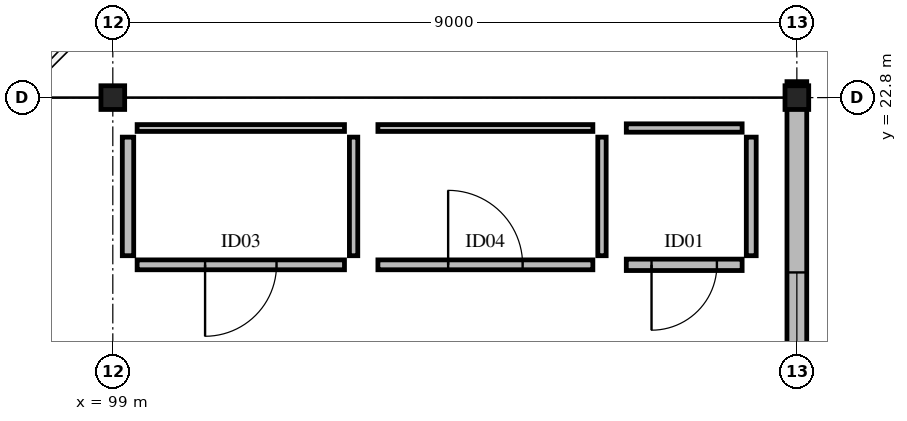
"""IFC4 building model, lengths in metres.
Left out: names, types, materials, properties, quantities, classifications, styles, units other than length and angle.
Written with IfcOpenShell. Run it as: python <this file> out.ifc"""

import sys

from ifc_helpers import new_model, si_unit, direction, frame, frame_2d, origin, origin_2d, place, context, subcontext, project, spatial, rectangle, i_section, extrude, element, fill, save


model = new_model("IFC4")
c1 = context("Model", 3, precision=1e-05, world=origin(), true_north=direction((0.0, 1.0)))
c2 = subcontext(c1, "Body", "Model", "MODEL_VIEW")
j1 = project(units=[si_unit("LENGTHUNIT", "METRE"), si_unit("PLANEANGLEUNIT", "RADIAN")], contexts=[c1])
p1 = place(None, origin())
s1 = spatial("IfcSite", under=j1, at=p1, CompositionType="ELEMENT")
p2 = place(p1, origin())
s2 = spatial("IfcBuilding", under=s1, at=p2, CompositionType="ELEMENT")
p3 = place(p2, frame((0.0, 0.0, 9.36)))
s3 = spatial("IfcBuildingStorey", under=s2, at=p3, CompositionType="ELEMENT", Elevation=9.36)
for number, where, z_axis, x_axis in (
    (1, (99.0, 22.8, 0.0), (0.0, 0.0, 1.0), (1.0, 0.0, 0.0)),
    (2, (108.0, 22.8, 0.0), (0.0, 0.0, 1.0), (1.0, 0.0, 0.0)),
):
    element("IfcColumn", number, at=place(p3, frame(where, z_axis=z_axis, x_axis=x_axis)), inside=s3, PredefinedType="COLUMN", context=c2, shape_type="SweptSolid", body=[
        extrude(i_section(OverallWidth=0.312, OverallDepth=0.312, WebThickness=0.017, FlangeThickness=0.017, FilletRadius=0.015, at=origin_2d()), origin(), (0.0, 0.0, 1.0), 4.32),
    ])
p4 = place(p3, frame((108.0, 15.2, 0.0), z_axis=(0.0, 0.0, 1.0), x_axis=(0.0, 1.0, 0.0)))
e3 = element("IfcWall", 3, at=p4, inside=s3, PredefinedType="STANDARD", context=c2, shape_type="SweptSolid", body=[
    extrude(rectangle(XDim=7.81, YDim=0.26, at=frame_2d((3.905, 0.0))), origin(), (0.0, 0.0, 1.0), 3.599),
])
p5 = place(p4, frame((2.3, 0.0, 0.85)))
e4 = element("IfcOpeningElement", 4, at=p5, cuts=e3, PredefinedType="OPENING", context=c2, shape_type="SweptSolid", body=[
    extrude(rectangle(XDim=3.0, YDim=1.5, at=frame_2d((1.5, 0.75))), frame((0.0, 0.14, 0.0), z_axis=(0.0, -1.0, 0.0), x_axis=(1.0, 0.0, 0.0)), (0.0, 0.0, 1.0), 0.28),
])
p6 = place(p3, frame((99.32, 20.6, 0.0), z_axis=(0.0, 0.0, 1.0), x_axis=(1.0, 0.0, 0.0)))
e5 = element("IfcWall", 5, at=p6, inside=s3, PredefinedType="PARTITIONING", context=c2, shape_type="SweptSolid", body=[
    extrude(rectangle(XDim=2.728, YDim=0.13, at=frame_2d((1.364, 0.0))), origin(), (0.0, 0.0, 1.0), 4.04),
])
p7 = place(p6, frame((0.894, 0.0, 0.0)))
e6 = element("IfcOpeningElement", 6, at=p7, cuts=e5, PredefinedType="OPENING", context=c2, shape_type="SweptSolid", body=[
    extrude(rectangle(XDim=0.94, YDim=2.06, at=frame_2d((0.47, 1.03))), frame((0.0, 0.075, 0.0), z_axis=(0.0, -1.0, 0.0), x_axis=(1.0, 0.0, 0.0)), (0.0, 0.0, 1.0), 0.15),
])
p8 = place(p3, frame((102.168, 20.72, 0.0), z_axis=(0.0, 0.0, 1.0), x_axis=(0.0, 1.0, 0.0)))
e7 = element("IfcWall", 7, at=p8, inside=s3, PredefinedType="PARTITIONING", context=c2, shape_type="SweptSolid", body=[
    extrude(rectangle(XDim=1.56, YDim=0.11, at=frame_2d((0.78, 0.0))), origin(), (0.0, 0.0, 1.0), 4.04),
])
p9 = place(p3, frame((99.32, 22.4, 0.0), z_axis=(0.0, 0.0, 1.0), x_axis=(1.0, 0.0, 0.0)))
e8 = element("IfcWall", 8, at=p9, inside=s3, PredefinedType="PARTITIONING", context=c2, shape_type="SweptSolid", body=[
    extrude(rectangle(XDim=2.728, YDim=0.09, at=frame_2d((1.364, 0.0))), origin(), (0.0, 0.0, 1.0), 4.04),
])
p10 = place(p3, frame((99.2, 20.72, 0.0), z_axis=(0.0, 0.0, 1.0), x_axis=(0.0, 1.0, 0.0)))
e9 = element("IfcWall", 9, at=p10, inside=s3, PredefinedType="PARTITIONING", context=c2, shape_type="SweptSolid", body=[
    extrude(rectangle(XDim=1.56, YDim=0.15, at=frame_2d((0.78, 0.0))), origin(), (0.0, 0.0, 1.0), 3.599),
])
p11 = place(p3, frame((102.488, 20.6, 0.0), z_axis=(0.0, 0.0, 1.0), x_axis=(1.0, 0.0, 0.0)))
e10 = element("IfcWall", 10, at=p11, inside=s3, PredefinedType="PARTITIONING", context=c2, shape_type="SweptSolid", body=[
    extrude(rectangle(XDim=2.828, YDim=0.13, at=frame_2d((1.414, 0.0))), origin(), (0.0, 0.0, 1.0), 4.04),
])
p12 = place(p11, frame((0.924, 0.0, 0.0)))
e11 = element("IfcOpeningElement", 11, at=p12, cuts=e10, PredefinedType="OPENING", context=c2, shape_type="SweptSolid", body=[
    extrude(rectangle(XDim=0.98, YDim=2.06, at=frame_2d((0.49, 1.03))), frame((0.0, 0.075, 0.0), z_axis=(0.0, -1.0, 0.0), x_axis=(1.0, 0.0, 0.0)), (0.0, 0.0, 1.0), 0.15),
])
p13 = place(p3, frame((105.436, 20.72, 0.0), z_axis=(0.0, 0.0, 1.0), x_axis=(0.0, 1.0, 0.0)))
e12 = element("IfcWall", 12, at=p13, inside=s3, PredefinedType="PARTITIONING", context=c2, shape_type="SweptSolid", body=[
    extrude(rectangle(XDim=1.56, YDim=0.11, at=frame_2d((0.78, 0.0))), origin(), (0.0, 0.0, 1.0), 4.04),
])
p14 = place(p3, frame((102.488, 22.4, 0.0), z_axis=(0.0, 0.0, 1.0), x_axis=(1.0, 0.0, 0.0)))
e13 = element("IfcWall", 13, at=p14, inside=s3, PredefinedType="PARTITIONING", context=c2, shape_type="SweptSolid", body=[
    extrude(rectangle(XDim=2.828, YDim=0.09, at=frame_2d((1.414, 0.0))), origin(), (0.0, 0.0, 1.0), 4.04),
])
p15 = place(p3, frame((105.756, 20.6, 0.0), z_axis=(0.0, 0.0, 1.0), x_axis=(1.0, 0.0, 0.0)))
e14 = element("IfcWall", 14, at=p15, inside=s3, PredefinedType="PARTITIONING", context=c2, shape_type="SweptSolid", body=[
    extrude(rectangle(XDim=1.524, YDim=0.15, at=frame_2d((0.762, 0.0))), origin(), (0.0, 0.0, 1.0), 4.04),
])
p16 = place(p15, frame((0.332, 0.0, 0.0)))
e15 = element("IfcOpeningElement", 15, at=p16, cuts=e14, PredefinedType="OPENING", context=c2, shape_type="SweptSolid", body=[
    extrude(rectangle(XDim=0.86, YDim=2.06, at=frame_2d((0.43, 1.03))), frame((0.0, 0.085, 0.0), z_axis=(0.0, -1.0, 0.0), x_axis=(1.0, 0.0, 0.0)), (0.0, 0.0, 1.0), 0.17),
])
p17 = place(p3, frame((107.4, 20.72, 0.0), z_axis=(0.0, 0.0, 1.0), x_axis=(0.0, 1.0, 0.0)))
e16 = element("IfcWall", 16, at=p17, inside=s3, PredefinedType="PARTITIONING", context=c2, shape_type="SweptSolid", body=[
    extrude(rectangle(XDim=1.56, YDim=0.13, at=frame_2d((0.78, 0.0))), origin(), (0.0, 0.0, 1.0), 4.04),
])
p18 = place(p3, frame((105.756, 22.4, 0.0), z_axis=(0.0, 0.0, 1.0), x_axis=(1.0, 0.0, 0.0)))
e17 = element("IfcWall", 17, at=p18, inside=s3, PredefinedType="PARTITIONING", context=c2, shape_type="SweptSolid", body=[
    extrude(rectangle(XDim=1.524, YDim=0.11, at=frame_2d((0.762, 0.0))), origin(), (0.0, 0.0, 1.0), 4.04),
])
p19 = place(p5, origin())
e18 = element("IfcWindow", 18, at=p19, inside=s3, PartitioningType="SINGLE_PANEL", PredefinedType="WINDOW", context=c2, shape_type="SweptSolid", body=[
    extrude(rectangle(XDim=3.0, YDim=1.5, at=frame_2d((1.5, 0.75))), frame((0.0, 0.03, 0.0), z_axis=(0.0, -1.0, 0.0), x_axis=(1.0, 0.0, 0.0)), (0.0, 0.0, 1.0), 0.06),
])
fill(e4, e18)
p20 = place(p7, origin())
e19 = element("IfcDoor", 19, at=p20, inside=s3, OperationType="SINGLE_SWING_RIGHT", PredefinedType="DOOR", context=c2, shape_type="SweptSolid", body=[
    extrude(rectangle(XDim=0.94, YDim=2.06, at=frame_2d((0.47, 1.03))), frame((0.0, 0.025, 0.0), z_axis=(0.0, -1.0, 0.0), x_axis=(1.0, 0.0, 0.0)), (0.0, 0.0, 1.0), 0.05),
])
fill(e6, e19)
p21 = place(p12, origin())
e20 = element("IfcDoor", 20, at=p21, inside=s3, OperationType="SINGLE_SWING_LEFT", PredefinedType="DOOR", context=c2, shape_type="SweptSolid", body=[
    extrude(rectangle(XDim=0.98, YDim=2.06, at=frame_2d((0.49, 1.03))), frame((0.0, 0.025, 0.0), z_axis=(0.0, -1.0, 0.0), x_axis=(1.0, 0.0, 0.0)), (0.0, 0.0, 1.0), 0.05),
])
fill(e11, e20)
p22 = place(p16, origin())
e21 = element("IfcDoor", 21, at=p22, inside=s3, OperationType="SINGLE_SWING_RIGHT", PredefinedType="DOOR", context=c2, shape_type="SweptSolid", body=[
    extrude(rectangle(XDim=0.86, YDim=2.06, at=frame_2d((0.43, 1.03))), frame((0.0, 0.025, 0.0), z_axis=(0.0, -1.0, 0.0), x_axis=(1.0, 0.0, 0.0)), (0.0, 0.0, 1.0), 0.05),
])
fill(e15, e21)
save(model, sys.argv[1])
